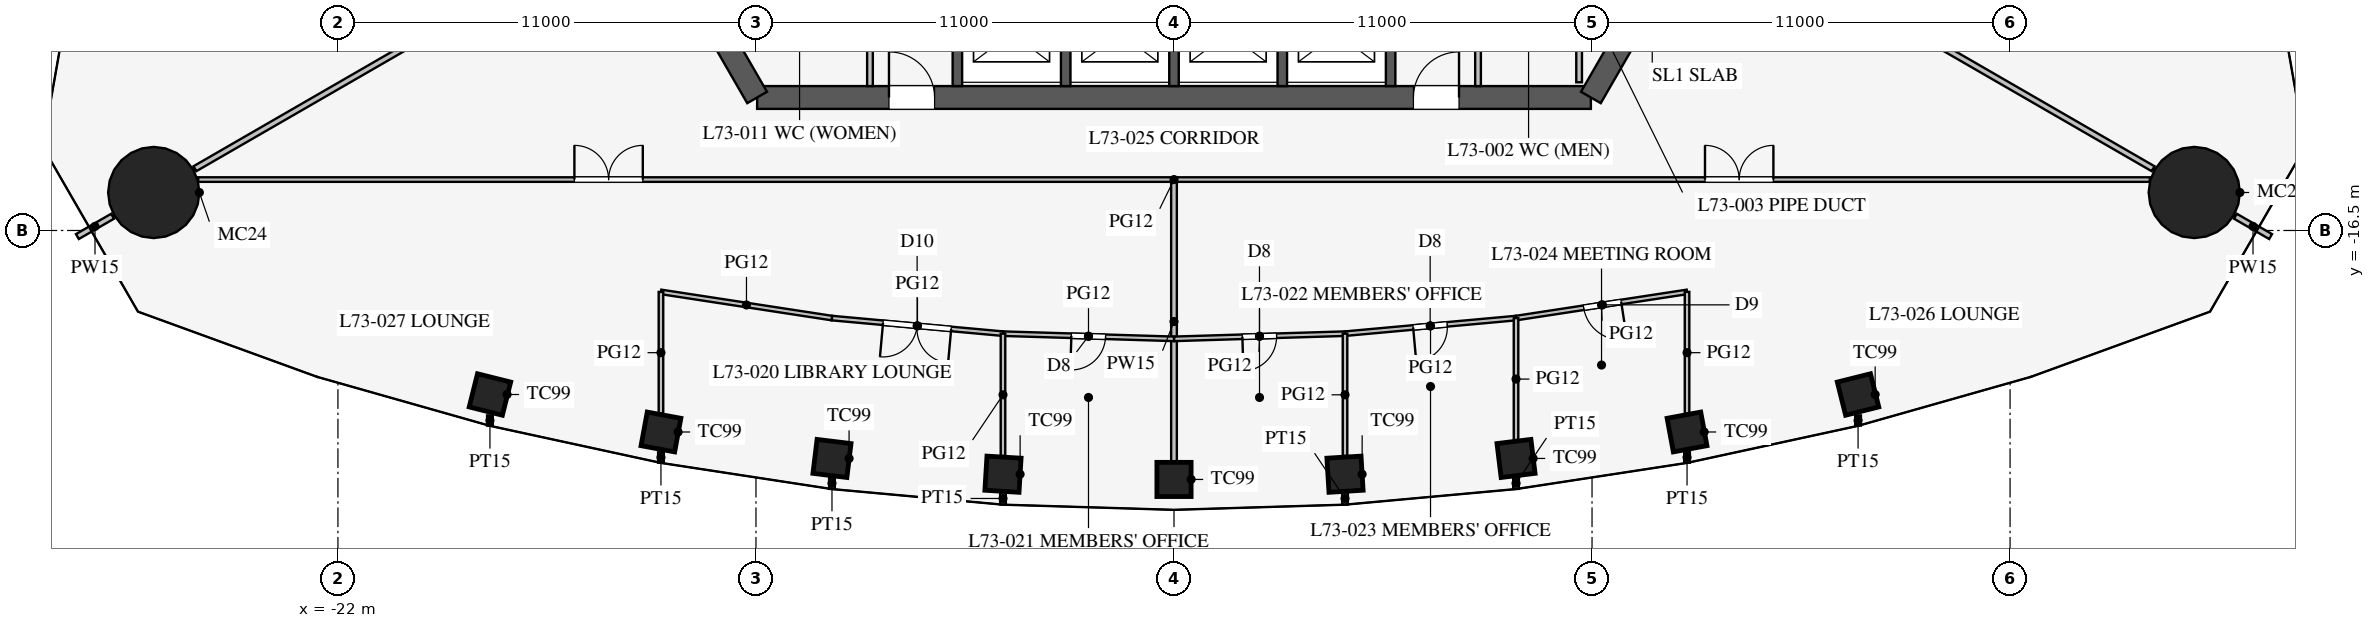
"""IFC4 building model, lengths in metres.
Left out: names, types, materials, properties, quantities, classifications, styles, units other than length and angle.
Written with IfcOpenShell. Run it as: python <this file> out.ifc"""

import sys

from ifc_helpers import new_model, si_unit, direction, frame, frame_2d, origin, origin_2d, place, context, subcontext, project, spatial, rectangle, circle, extrude, element, fill, save


model = new_model("IFC4")
c1 = context("Model", 3, precision=1e-05, world=origin(), true_north=direction((0.0, 1.0)))
c2 = subcontext(c1, "Body", "Model", "MODEL_VIEW")
j1 = project(units=[si_unit("LENGTHUNIT", "METRE"), si_unit("PLANEANGLEUNIT", "RADIAN")], contexts=[c1])
p1 = place(None, origin())
s1 = spatial("IfcSite", under=j1, at=p1, CompositionType="ELEMENT")
p2 = place(p1, origin())
s2 = spatial("IfcBuilding", under=s1, at=p2, CompositionType="ELEMENT")
p3 = place(p2, frame((0.0, 0.0, 318.3)))
s3 = spatial("IfcBuildingStorey", under=s2, at=p3, CompositionType="ELEMENT", Elevation=318.3)
for number, where, z_axis, x_axis in (
    (1, (-18.0, -20.816, 0.0), (0.0, 0.0, 1.0), (0.97, -0.242, 0.0)),
    (2, (-13.5, -21.803, 0.0), (0.0, 0.0, 1.0), (0.983, -0.182, 0.0)),
    (3, (-9.0, -22.499, 0.0), (0.0, 0.0, 1.0), (0.993, -0.121, 0.0)),
    (4, (-4.5, -22.914, 0.0), (0.0, 0.0, 1.0), (0.998, -0.061, 0.0)),
    (5, (0.0, -23.052, 0.0), (0.0, 0.0, 1.0), (1.0, 0.0, 0.0)),
    (6, (4.5, -22.914, 0.0), (0.0, 0.0, 1.0), (0.998, 0.061, 0.0)),
    (7, (9.0, -22.499, 0.0), (0.0, 0.0, 1.0), (0.993, 0.121, 0.0)),
    (8, (13.5, -21.803, 0.0), (0.0, 0.0, 1.0), (0.983, 0.182, 0.0)),
    (9, (18.0, -20.816, 0.0), (0.0, 0.0, 1.0), (0.97, 0.242, 0.0)),
):
    element("IfcColumn", number, at=place(p3, frame(where, z_axis=z_axis, x_axis=x_axis)), inside=s3, PredefinedType="COLUMN", context=c2, shape_type="SweptSolid", body=[
        extrude(rectangle(XDim=0.9, YDim=0.9, at=origin_2d()), origin(), (0.0, 0.0, 1.0), 4.2),
    ])
for number, where, z_axis, x_axis in (
    (10, (26.847, -15.5, 0.0), (0.0, 0.0, 1.0), (1.0, 0.0, 0.0)),
    (11, (-26.847, -15.5, 0.0), (0.0, 0.0, 1.0), (1.0, 0.0, 0.0)),
):
    element("IfcColumn", number, at=place(p3, frame(where, z_axis=z_axis, x_axis=x_axis)), inside=s3, PredefinedType="COLUMN", context=c2, shape_type="SweptSolid", body=[
        extrude(circle(Radius=1.2, at=origin_2d()), origin(), (0.0, 0.0, 1.0), 4.2),
    ])
p4 = place(p3, frame((-10.97, -13.0, 0.0), z_axis=(0.0, 0.0, 1.0), x_axis=(1.0, 0.0, 0.0)))
e12 = element("IfcWall", 12, at=p4, inside=s3, PredefinedType="SHEAR", context=c2, shape_type="SweptSolid", body=[
    extrude(rectangle(XDim=21.939, YDim=0.6, at=frame_2d((10.97, 0.0))), origin(), (0.0, 0.0, 1.0), 4.2),
])
p5 = place(p4, frame((17.27, 0.0, 0.0)))
e13 = element("IfcOpeningElement", 13, at=p5, cuts=e12, PredefinedType="OPENING", context=c2, shape_type="SweptSolid", body=[
    extrude(rectangle(XDim=1.2, YDim=2.1, at=frame_2d((0.6, 1.05))), frame((0.0, 0.31, 0.0), z_axis=(0.0, -1.0, 0.0), x_axis=(1.0, 0.0, 0.0)), (0.0, 0.0, 1.0), 0.62),
])
p6 = place(p4, frame((3.47, 0.0, 0.0)))
e14 = element("IfcOpeningElement", 14, at=p6, cuts=e12, PredefinedType="OPENING", context=c2, shape_type="SweptSolid", body=[
    extrude(rectangle(XDim=1.2, YDim=2.1, at=frame_2d((0.6, 1.05))), frame((0.0, 0.31, 0.0), z_axis=(0.0, -1.0, 0.0), x_axis=(1.0, 0.0, 0.0)), (0.0, 0.0, 1.0), 0.62),
])
for number, where, z_axis, x_axis in (
    (15, (10.97, -13.0, 0.0), (0.0, 0.0, 1.0), (0.5, 0.866, 0.0)),
    (16, (-16.743, -3.0, 0.0), (0.0, 0.0, 1.0), (0.5, -0.866, 0.0)),
):
    element("IfcWall", number, at=place(p3, frame(where, z_axis=z_axis, x_axis=x_axis)), inside=s3, PredefinedType="SHEAR", context=c2, shape_type="SweptSolid", body=[
        extrude(rectangle(XDim=11.547, YDim=0.6, at=frame_2d((5.773, 0.0))), origin(), (0.0, 0.0, 1.0), 4.2),
    ])
for number, where, z_axis, x_axis in (
    (17, (-5.7, -10.025, 0.0), (0.0, 0.0, 1.0), (0.0, -1.0, 0.0)),
    (18, (-2.85, -10.025, 0.0), (0.0, 0.0, 1.0), (0.0, -1.0, 0.0)),
    (19, (0.0, -10.025, 0.0), (0.0, 0.0, 1.0), (0.0, -1.0, 0.0)),
    (20, (2.85, -10.025, 0.0), (0.0, 0.0, 1.0), (0.0, -1.0, 0.0)),
    (21, (5.7, -10.025, 0.0), (0.0, 0.0, 1.0), (0.0, -1.0, 0.0)),
):
    element("IfcWall", number, at=place(p3, frame(where, z_axis=z_axis, x_axis=x_axis)), inside=s3, PredefinedType="SHEAR", context=c2, shape_type="SweptSolid", body=[
        extrude(rectangle(XDim=2.675, YDim=0.25, at=frame_2d((1.337, 0.0))), origin(), (0.0, 0.0, 1.0), 4.2),
    ])
p7 = place(p3, frame((8.0, -7.5, 0.0), z_axis=(0.0, 0.0, 1.0), x_axis=(0.0, -1.0, 0.0)))
e22 = element("IfcWall", 22, at=p7, inside=s3, PredefinedType="PARTITIONING", context=c2, shape_type="SweptSolid", body=[
    extrude(rectangle(XDim=5.2, YDim=0.15, at=frame_2d((2.6, 0.0))), origin(), (0.0, 0.0, 1.0), 4.0),
])
p8 = place(p7, frame((1.3, 0.0, 0.0)))
e23 = element("IfcOpeningElement", 23, at=p8, cuts=e22, PredefinedType="OPENING", context=c2, shape_type="SweptSolid", body=[
    extrude(rectangle(XDim=0.9, YDim=2.1, at=frame_2d((0.45, 1.05))), frame((0.0, 0.085, 0.0), z_axis=(0.0, -1.0, 0.0), x_axis=(1.0, 0.0, 0.0)), (0.0, 0.0, 1.0), 0.17),
])
p9 = place(p3, frame((-8.0, -7.5, 0.0), z_axis=(0.0, 0.0, 1.0), x_axis=(0.0, -1.0, 0.0)))
e24 = element("IfcWall", 24, at=p9, inside=s3, PredefinedType="PARTITIONING", context=c2, shape_type="SweptSolid", body=[
    extrude(rectangle(XDim=5.2, YDim=0.15, at=frame_2d((2.6, 0.0))), origin(), (0.0, 0.0, 1.0), 4.0),
])
p10 = place(p9, frame((2.6, 0.0, 0.0)))
e25 = element("IfcOpeningElement", 25, at=p10, cuts=e24, PredefinedType="OPENING", context=c2, shape_type="SweptSolid", body=[
    extrude(rectangle(XDim=0.9, YDim=2.1, at=frame_2d((0.45, 1.05))), frame((0.0, 0.085, 0.0), z_axis=(0.0, -1.0, 0.0), x_axis=(1.0, 0.0, 0.0)), (0.0, 0.0, 1.0), 0.17),
])
p11 = place(p3, frame((10.66, -8.5, 0.0), z_axis=(0.0, 0.0, 1.0), x_axis=(0.0, -1.0, 0.0)))
e26 = element("IfcWall", 26, at=p11, inside=s3, PredefinedType="PARTITIONING", context=c2, shape_type="SweptSolid", body=[
    extrude(rectangle(XDim=4.1, YDim=0.15, at=frame_2d((2.05, 0.0))), origin(), (0.0, 0.0, 1.0), 4.0),
])
p12 = place(p3, frame((14.116, -8.15, 0.0), z_axis=(0.0, 0.0, 1.0), x_axis=(0.866020541135, -0.500008422262, 0.0)))
e27 = element("IfcWall", 27, at=p12, inside=s3, PredefinedType="PARTITIONING", context=c2, shape_type="SweptSolid", body=[
    extrude(rectangle(XDim=13.45, YDim=0.15, at=frame_2d((6.725, 0.0))), origin(), (0.0, 0.0, 1.0), 2.0),
])
p13 = place(p3, frame((27.929, -16.125, 0.0), z_axis=(0.0, 0.0, 1.0), x_axis=(0.866086810508, -0.499893625349, 0.0)))
e28 = element("IfcWall", 28, at=p13, inside=s3, PredefinedType="PARTITIONING", context=c2, shape_type="SweptSolid", body=[
    extrude(rectangle(XDim=1.07, YDim=0.15, at=frame_2d((0.535, 0.0))), origin(), (0.0, 0.0, 1.0), 2.0),
])
p14 = place(p3, frame((-14.116, -8.15, 0.0), z_axis=(0.0, 0.0, 1.0), x_axis=(-0.866020541135, -0.500008422262, 0.0)))
e29 = element("IfcWall", 29, at=p14, inside=s3, PredefinedType="PARTITIONING", context=c2, shape_type="SweptSolid", body=[
    extrude(rectangle(XDim=13.45, YDim=0.15, at=frame_2d((6.725, 0.0))), origin(), (0.0, 0.0, 1.0), 2.0),
])
p15 = place(p3, frame((-27.929, -16.125, 0.0), z_axis=(0.0, 0.0, 1.0), x_axis=(-0.866086810508, -0.499893625349, 0.0)))
e30 = element("IfcWall", 30, at=p15, inside=s3, PredefinedType="PARTITIONING", context=c2, shape_type="SweptSolid", body=[
    extrude(rectangle(XDim=1.07, YDim=0.15, at=frame_2d((0.535, 0.0))), origin(), (0.0, 0.0, 1.0), 2.0),
])
p16 = place(p3, frame((0.0, -15.22, 0.0), z_axis=(0.0, 0.0, 1.0), x_axis=(0.0, -1.0, 0.0)))
e31 = element("IfcWall", 31, at=p16, inside=s3, PredefinedType="PARTITIONING", context=c2, shape_type="SweptSolid", body=[
    extrude(rectangle(XDim=7.352, YDim=0.15, at=frame_2d((3.676, 0.0))), origin(), (0.0, 0.0, 1.0), 3.3),
])
p17 = place(p3, frame((-25.678, -15.16, 0.0), z_axis=(0.0, 0.0, 1.0), x_axis=(1.0, 0.0, 0.0)))
e32 = element("IfcWall", 32, at=p17, inside=s3, PredefinedType="PARTITIONING", context=c2, shape_type="SweptSolid", body=[
    extrude(rectangle(XDim=51.355, YDim=0.12, at=frame_2d((25.678, 0.0))), origin(), (0.0, 0.0, 1.0), 2.9),
])
p18 = place(p17, frame((9.9, 0.0, 0.15)))
e33 = element("IfcOpeningElement", 33, at=p18, cuts=e32, PredefinedType="OPENING", context=c2, shape_type="SweptSolid", body=[
    extrude(rectangle(XDim=1.8, YDim=2.1, at=frame_2d((0.9, 1.05))), frame((0.0, 0.07, 0.0), z_axis=(0.0, -1.0, 0.0), x_axis=(1.0, 0.0, 0.0)), (0.0, 0.0, 1.0), 0.14),
])
p19 = place(p17, frame((39.65, 0.0, 0.15)))
e34 = element("IfcOpeningElement", 34, at=p19, cuts=e32, PredefinedType="OPENING", context=c2, shape_type="SweptSolid", body=[
    extrude(rectangle(XDim=1.8, YDim=2.1, at=frame_2d((0.9, 1.05))), frame((0.0, 0.07, 0.0), z_axis=(0.0, -1.0, 0.0), x_axis=(1.0, 0.0, 0.0)), (0.0, 0.0, 1.0), 0.14),
])
p20 = place(p3, frame((13.5, -22.331, 0.0), z_axis=(0.0, 0.0, 1.0), x_axis=(0.0, -1.0, 0.0)))
e35 = element("IfcWall", 35, at=p20, inside=s3, PredefinedType="PARTITIONING", context=c2, shape_type="SweptSolid", body=[
    extrude(rectangle(XDim=0.28, YDim=0.15, at=frame_2d((0.14, 0.0))), origin(), (0.0, 0.0, 1.0), 2.9),
])
p21 = place(p3, frame((18.0, -21.366, 0.0), z_axis=(0.0, 0.0, 1.0), x_axis=(0.0, -1.0, 0.0)))
e36 = element("IfcWall", 36, at=p21, inside=s3, PredefinedType="PARTITIONING", context=c2, shape_type="SweptSolid", body=[
    extrude(rectangle(XDim=0.27, YDim=0.15, at=frame_2d((0.135, 0.0))), origin(), (0.0, 0.0, 1.0), 2.9),
])
p22 = place(p3, frame((4.5, -23.394, 0.0), z_axis=(0.0, 0.0, 1.0), x_axis=(0.0, -1.0, 0.0)))
e37 = element("IfcWall", 37, at=p22, inside=s3, PredefinedType="PARTITIONING", context=c2, shape_type="SweptSolid", body=[
    extrude(rectangle(XDim=0.316, YDim=0.15, at=frame_2d((0.158, 0.0))), origin(), (0.0, 0.0, 1.0), 2.9),
])
p23 = place(p3, frame((9.0, -23.004, 0.0), z_axis=(0.0, 0.0, 1.0), x_axis=(0.0, -1.0, 0.0)))
e38 = element("IfcWall", 38, at=p23, inside=s3, PredefinedType="PARTITIONING", context=c2, shape_type="SweptSolid", body=[
    extrude(rectangle(XDim=0.296, YDim=0.15, at=frame_2d((0.148, 0.0))), origin(), (0.0, 0.0, 1.0), 2.9),
])
p24 = place(p3, frame((-13.5, -22.331, 0.0), z_axis=(0.0, 0.0, 1.0), x_axis=(0.0, -1.0, 0.0)))
e39 = element("IfcWall", 39, at=p24, inside=s3, PredefinedType="PARTITIONING", context=c2, shape_type="SweptSolid", body=[
    extrude(rectangle(XDim=0.28, YDim=0.15, at=frame_2d((0.14, 0.0))), origin(), (0.0, 0.0, 1.0), 2.9),
])
p25 = place(p3, frame((-18.0, -21.366, 0.0), z_axis=(0.0, 0.0, 1.0), x_axis=(0.0, -1.0, 0.0)))
e40 = element("IfcWall", 40, at=p25, inside=s3, PredefinedType="PARTITIONING", context=c2, shape_type="SweptSolid", body=[
    extrude(rectangle(XDim=0.27, YDim=0.15, at=frame_2d((0.135, 0.0))), origin(), (0.0, 0.0, 1.0), 2.9),
])
p26 = place(p3, frame((-4.5, -23.394, 0.0), z_axis=(0.0, 0.0, 1.0), x_axis=(0.0, -1.0, 0.0)))
e41 = element("IfcWall", 41, at=p26, inside=s3, PredefinedType="PARTITIONING", context=c2, shape_type="SweptSolid", body=[
    extrude(rectangle(XDim=0.316, YDim=0.15, at=frame_2d((0.158, 0.0))), origin(), (0.0, 0.0, 1.0), 2.9),
])
p27 = place(p3, frame((-9.0, -23.004, 0.0), z_axis=(0.0, 0.0, 1.0), x_axis=(0.0, -1.0, 0.0)))
e42 = element("IfcWall", 42, at=p27, inside=s3, PredefinedType="PARTITIONING", context=c2, shape_type="SweptSolid", body=[
    extrude(rectangle(XDim=0.296, YDim=0.15, at=frame_2d((0.148, 0.0))), origin(), (0.0, 0.0, 1.0), 2.9),
])
p28 = place(p3, frame((0.0, -19.352, 0.0), z_axis=(0.0, 0.0, 1.0), x_axis=(0.999542074227, 0.030259574513, 0.0)))
e43 = element("IfcWall", 43, at=p28, inside=s3, PredefinedType="PARTITIONING", context=c2, shape_type="SweptSolid", body=[
    extrude(rectangle(XDim=4.502, YDim=0.12, at=frame_2d((2.251, 0.0))), origin(), (0.0, 0.0, 1.0), 2.9),
])
p29 = place(p28, frame((1.8, 0.0, 0.15)))
e44 = element("IfcOpeningElement", 44, at=p29, cuts=e43, PredefinedType="OPENING", context=c2, shape_type="SweptSolid", body=[
    extrude(rectangle(XDim=0.9, YDim=2.1, at=frame_2d((0.45, 1.05))), frame((0.0, 0.07, 0.0), z_axis=(0.0, -1.0, 0.0), x_axis=(1.0, 0.0, 0.0)), (0.0, 0.0, 1.0), 0.14),
])
p30 = place(p3, frame((4.5, -19.215, 0.0), z_axis=(0.0, 0.0, 1.0), x_axis=(0.995871921504, 0.090769576179, 0.0)))
e45 = element("IfcWall", 45, at=p30, inside=s3, PredefinedType="PARTITIONING", context=c2, shape_type="SweptSolid", body=[
    extrude(rectangle(XDim=4.519, YDim=0.12, at=frame_2d((2.259, 0.0))), origin(), (0.0, 0.0, 1.0), 2.9),
])
p31 = place(p30, frame((1.8, 0.0, 0.15)))
e46 = element("IfcOpeningElement", 46, at=p31, cuts=e45, PredefinedType="OPENING", context=c2, shape_type="SweptSolid", body=[
    extrude(rectangle(XDim=0.9, YDim=2.1, at=frame_2d((0.45, 1.05))), frame((0.0, 0.07, 0.0), z_axis=(0.0, -1.0, 0.0), x_axis=(1.0, 0.0, 0.0)), (0.0, 0.0, 1.0), 0.14),
])
p32 = place(p3, frame((9.0, -18.805, 0.0), z_axis=(0.0, 0.0, 1.0), x_axis=(0.988481794406, 0.151339823341, 0.0)))
e47 = element("IfcWall", 47, at=p32, inside=s3, PredefinedType="PARTITIONING", context=c2, shape_type="SweptSolid", body=[
    extrude(rectangle(XDim=4.552, YDim=0.12, at=frame_2d((2.276, 0.0))), origin(), (0.0, 0.0, 1.0), 2.9),
])
p33 = place(p32, frame((1.8, 0.0, 0.15)))
e48 = element("IfcOpeningElement", 48, at=p33, cuts=e47, PredefinedType="OPENING", context=c2, shape_type="SweptSolid", body=[
    extrude(rectangle(XDim=1.0, YDim=2.1, at=frame_2d((0.5, 1.05))), frame((0.0, 0.07, 0.0), z_axis=(0.0, -1.0, 0.0), x_axis=(1.0, 0.0, 0.0)), (0.0, 0.0, 1.0), 0.14),
])
p34 = place(p3, frame((-13.5, -18.116, 0.0), z_axis=(0.0, 0.0, 1.0), x_axis=(0.988481794406, -0.151339823341, 0.0)))
e49 = element("IfcWall", 49, at=p34, inside=s3, PredefinedType="PARTITIONING", context=c2, shape_type="SweptSolid", body=[
    extrude(rectangle(XDim=4.552, YDim=0.12, at=frame_2d((2.276, 0.0))), origin(), (0.0, 0.0, 1.0), 2.9),
])
p35 = place(p3, frame((-4.5, -19.215, 0.0), z_axis=(0.0, 0.0, 1.0), x_axis=(0.999542074227, -0.030259574513, 0.0)))
e50 = element("IfcWall", 50, at=p35, inside=s3, PredefinedType="PARTITIONING", context=c2, shape_type="SweptSolid", body=[
    extrude(rectangle(XDim=4.502, YDim=0.12, at=frame_2d((2.251, 0.0))), origin(), (0.0, 0.0, 1.0), 2.9),
])
p36 = place(p35, frame((1.8, 0.0, 0.15)))
e51 = element("IfcOpeningElement", 51, at=p36, cuts=e50, PredefinedType="OPENING", context=c2, shape_type="SweptSolid", body=[
    extrude(rectangle(XDim=0.9, YDim=2.1, at=frame_2d((0.45, 1.05))), frame((0.0, 0.07, 0.0), z_axis=(0.0, -1.0, 0.0), x_axis=(1.0, 0.0, 0.0)), (0.0, 0.0, 1.0), 0.14),
])
p37 = place(p3, frame((-9.0, -18.805, 0.0), z_axis=(0.0, 0.0, 1.0), x_axis=(0.995871921504, -0.090769576179, 0.0)))
e52 = element("IfcWall", 52, at=p37, inside=s3, PredefinedType="PARTITIONING", context=c2, shape_type="SweptSolid", body=[
    extrude(rectangle(XDim=4.519, YDim=0.12, at=frame_2d((2.259, 0.0))), origin(), (0.0, 0.0, 1.0), 2.9),
])
p38 = place(p37, frame((1.35, 0.0, 0.15)))
e53 = element("IfcOpeningElement", 53, at=p38, cuts=e52, PredefinedType="OPENING", context=c2, shape_type="SweptSolid", body=[
    extrude(rectangle(XDim=1.8, YDim=2.1, at=frame_2d((0.9, 1.05))), frame((0.0, 0.07, 0.0), z_axis=(0.0, -1.0, 0.0), x_axis=(1.0, 0.0, 0.0)), (0.0, 0.0, 1.0), 0.14),
])
p39 = place(p3, frame((13.5, -18.116, 0.0), z_axis=(0.0, 0.0, 1.0), x_axis=(0.0, -1.0, 0.0)))
e54 = element("IfcWall", 54, at=p39, inside=s3, PredefinedType="PARTITIONING", context=c2, shape_type="SweptSolid", body=[
    extrude(rectangle(XDim=3.198, YDim=0.12, at=frame_2d((1.599, 0.0))), origin(), (0.0, 0.0, 1.0), 2.9),
])
p40 = place(p3, frame((4.5, -19.215, 0.0), z_axis=(0.0, 0.0, 1.0), x_axis=(0.0, -1.0, 0.0)))
e55 = element("IfcWall", 55, at=p40, inside=s3, PredefinedType="PARTITIONING", context=c2, shape_type="SweptSolid", body=[
    extrude(rectangle(XDim=3.218, YDim=0.12, at=frame_2d((1.609, 0.0))), origin(), (0.0, 0.0, 1.0), 2.9),
])
p41 = place(p3, frame((9.0, -18.805, 0.0), z_axis=(0.0, 0.0, 1.0), x_axis=(0.0, -1.0, 0.0)))
e56 = element("IfcWall", 56, at=p41, inside=s3, PredefinedType="PARTITIONING", context=c2, shape_type="SweptSolid", body=[
    extrude(rectangle(XDim=3.21, YDim=0.12, at=frame_2d((1.605, 0.0))), origin(), (0.0, 0.0, 1.0), 2.9),
])
p42 = place(p3, frame((-13.5, -18.116, 0.0), z_axis=(0.0, 0.0, 1.0), x_axis=(0.0, -1.0, 0.0)))
e57 = element("IfcWall", 57, at=p42, inside=s3, PredefinedType="PARTITIONING", context=c2, shape_type="SweptSolid", body=[
    extrude(rectangle(XDim=3.198, YDim=0.12, at=frame_2d((1.599, 0.0))), origin(), (0.0, 0.0, 1.0), 2.9),
])
p43 = place(p3, frame((-4.5, -19.215, 0.0), z_axis=(0.0, 0.0, 1.0), x_axis=(0.0, -1.0, 0.0)))
e58 = element("IfcWall", 58, at=p43, inside=s3, PredefinedType="PARTITIONING", context=c2, shape_type="SweptSolid", body=[
    extrude(rectangle(XDim=3.218, YDim=0.12, at=frame_2d((1.609, 0.0))), origin(), (0.0, 0.0, 1.0), 2.9),
])
p44 = place(p5, origin())
e59 = element("IfcDoor", 59, at=p44, inside=s3, OperationType="SINGLE_SWING_RIGHT", PredefinedType="DOOR", context=c2, shape_type="SweptSolid", body=[
    extrude(rectangle(XDim=1.2, YDim=2.1, at=frame_2d((0.6, 1.05))), frame((0.0, 0.025, 0.0), z_axis=(0.0, -1.0, 0.0), x_axis=(1.0, 0.0, 0.0)), (0.0, 0.0, 1.0), 0.05),
])
fill(e13, e59)
p45 = place(p6, origin())
e60 = element("IfcDoor", 60, at=p45, inside=s3, OperationType="SINGLE_SWING_LEFT", PredefinedType="DOOR", context=c2, shape_type="SweptSolid", body=[
    extrude(rectangle(XDim=1.2, YDim=2.1, at=frame_2d((0.6, 1.05))), frame((0.0, 0.025, 0.0), z_axis=(0.0, -1.0, 0.0), x_axis=(1.0, 0.0, 0.0)), (0.0, 0.0, 1.0), 0.05),
])
fill(e14, e60)
p46 = place(p38, frame((1.8, 0.0, 0.0), z_axis=(0.0, 0.0, 1.0), x_axis=(-1.0, 0.0, 0.0)))
e61 = element("IfcDoor", 61, at=p46, inside=s3, OperationType="DOUBLE_DOOR_SINGLE_SWING", PredefinedType="DOOR", context=c2, shape_type="SweptSolid", body=[
    extrude(rectangle(XDim=1.8, YDim=2.1, at=frame_2d((0.9, 1.05))), frame((0.0, 0.025, 0.0), z_axis=(0.0, -1.0, 0.0), x_axis=(1.0, 0.0, 0.0)), (0.0, 0.0, 1.0), 0.05),
])
fill(e53, e61)
p47 = place(p36, frame((0.9, 0.0, 0.0), z_axis=(0.0, 0.0, 1.0), x_axis=(-1.0, 0.0, 0.0)))
e62 = element("IfcDoor", 62, at=p47, inside=s3, OperationType="SINGLE_SWING_RIGHT", PredefinedType="DOOR", context=c2, shape_type="SweptSolid", body=[
    extrude(rectangle(XDim=0.9, YDim=2.1, at=frame_2d((0.45, 1.05))), frame((0.0, 0.025, 0.0), z_axis=(0.0, -1.0, 0.0), x_axis=(1.0, 0.0, 0.0)), (0.0, 0.0, 1.0), 0.05),
])
fill(e51, e62)
p48 = place(p29, frame((0.9, 0.0, 0.0), z_axis=(0.0, 0.0, 1.0), x_axis=(-1.0, 0.0, 0.0)))
e63 = element("IfcDoor", 63, at=p48, inside=s3, OperationType="SINGLE_SWING_RIGHT", PredefinedType="DOOR", context=c2, shape_type="SweptSolid", body=[
    extrude(rectangle(XDim=0.9, YDim=2.1, at=frame_2d((0.45, 1.05))), frame((0.0, 0.025, 0.0), z_axis=(0.0, -1.0, 0.0), x_axis=(1.0, 0.0, 0.0)), (0.0, 0.0, 1.0), 0.05),
])
fill(e44, e63)
p49 = place(p31, frame((0.9, 0.0, 0.0), z_axis=(0.0, 0.0, 1.0), x_axis=(-1.0, 0.0, 0.0)))
e64 = element("IfcDoor", 64, at=p49, inside=s3, OperationType="SINGLE_SWING_RIGHT", PredefinedType="DOOR", context=c2, shape_type="SweptSolid", body=[
    extrude(rectangle(XDim=0.9, YDim=2.1, at=frame_2d((0.45, 1.05))), frame((0.0, 0.025, 0.0), z_axis=(0.0, -1.0, 0.0), x_axis=(1.0, 0.0, 0.0)), (0.0, 0.0, 1.0), 0.05),
])
fill(e46, e64)
p50 = place(p33, frame((1.0, 0.0, 0.0), z_axis=(0.0, 0.0, 1.0), x_axis=(-1.0, 0.0, 0.0)))
e65 = element("IfcDoor", 65, at=p50, inside=s3, OperationType="SINGLE_SWING_LEFT", PredefinedType="DOOR", context=c2, shape_type="SweptSolid", body=[
    extrude(rectangle(XDim=1.0, YDim=2.1, at=frame_2d((0.5, 1.05))), frame((0.0, 0.025, 0.0), z_axis=(0.0, -1.0, 0.0), x_axis=(1.0, 0.0, 0.0)), (0.0, 0.0, 1.0), 0.05),
])
fill(e48, e65)
p51 = place(p18, origin())
e66 = element("IfcDoor", 66, at=p51, inside=s3, OperationType="DOUBLE_DOOR_SINGLE_SWING", PredefinedType="DOOR", context=c2, shape_type="SweptSolid", body=[
    extrude(rectangle(XDim=1.8, YDim=2.1, at=frame_2d((0.9, 1.05))), frame((0.0, 0.025, 0.0), z_axis=(0.0, -1.0, 0.0), x_axis=(1.0, 0.0, 0.0)), (0.0, 0.0, 1.0), 0.05),
])
fill(e33, e66)
p52 = place(p19, origin())
e67 = element("IfcDoor", 67, at=p52, inside=s3, OperationType="DOUBLE_DOOR_SINGLE_SWING", PredefinedType="DOOR", context=c2, shape_type="SweptSolid", body=[
    extrude(rectangle(XDim=1.8, YDim=2.1, at=frame_2d((0.9, 1.05))), frame((0.0, 0.025, 0.0), z_axis=(0.0, -1.0, 0.0), x_axis=(1.0, 0.0, 0.0)), (0.0, 0.0, 1.0), 0.05),
])
fill(e34, e67)
save(model, sys.argv[1])
